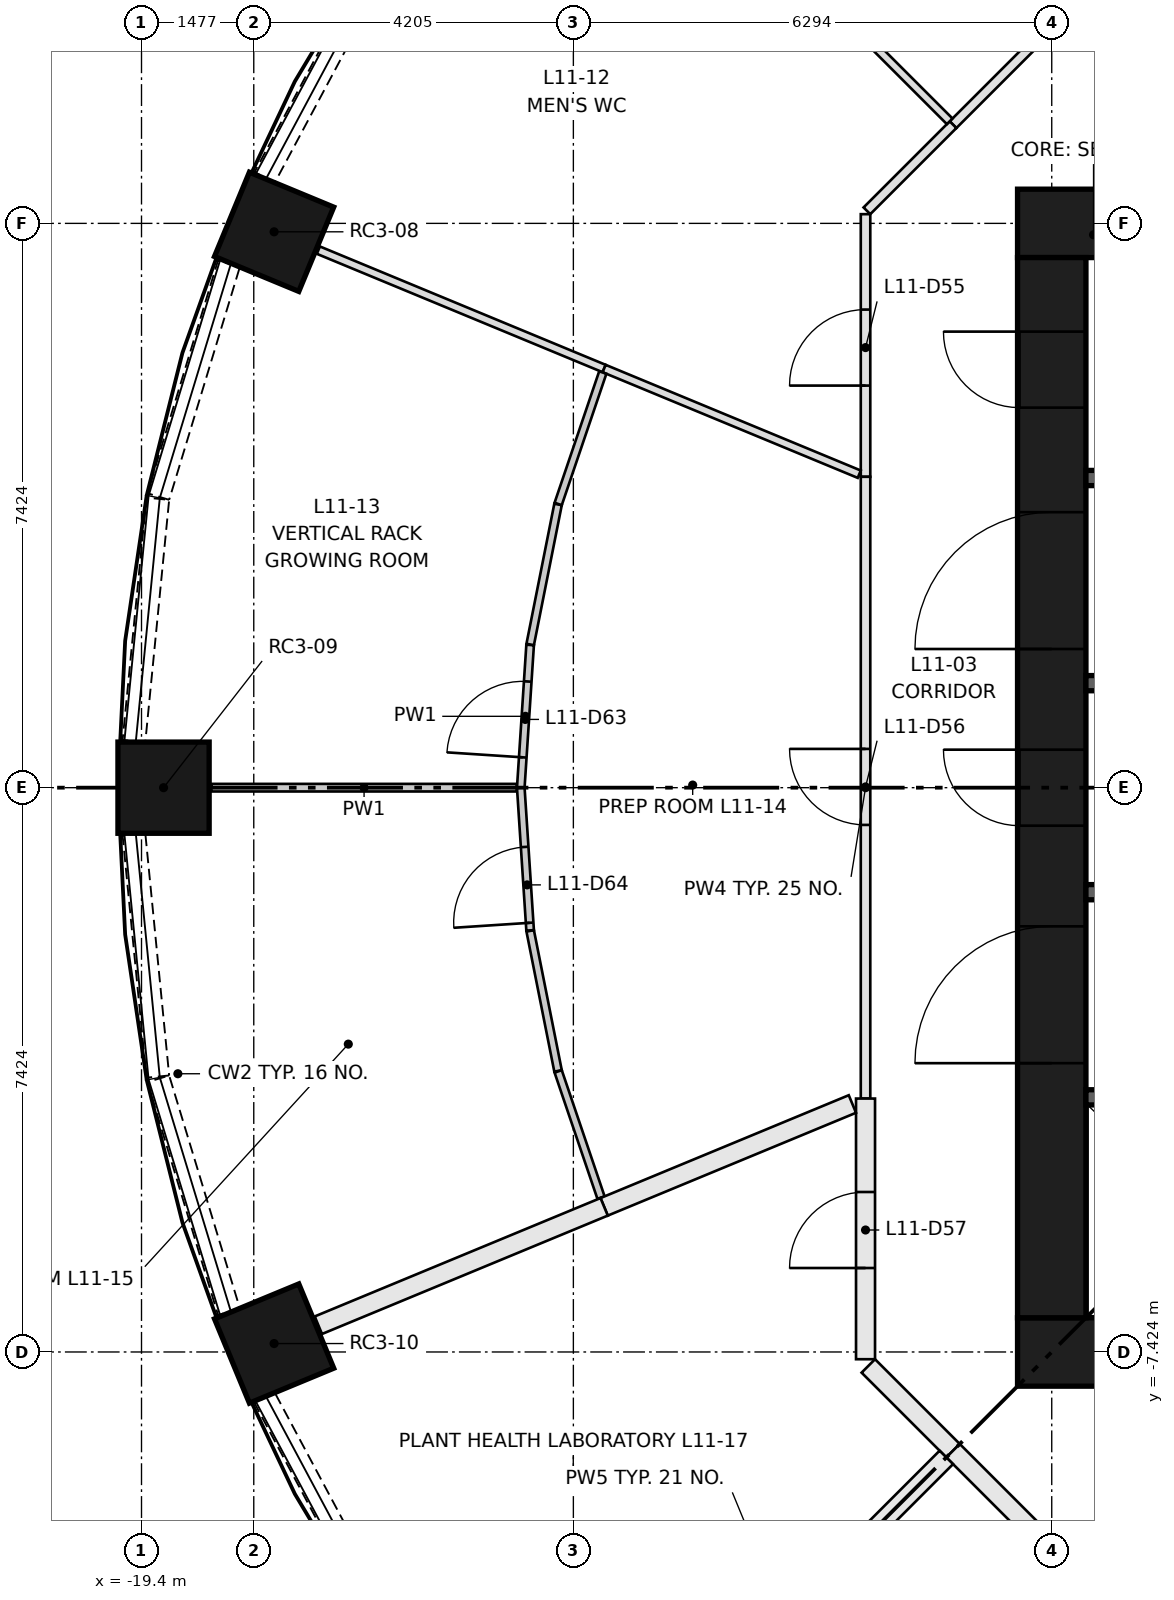
"""IFC4 building model, lengths in metres.
Left out: names, types, materials, properties, quantities, classifications, styles, units other than length and angle.
Written with IfcOpenShell. Run it as: python <this file> out.ifc"""

import sys

from ifc_helpers import new_model, si_unit, direction, frame, frame_2d, origin, origin_2d, place, context, subcontext, project, spatial, rectangle, extrude, element, fill, save


model = new_model("IFC4")
c1 = context("Model", 3, precision=1e-05, world=origin(), true_north=direction((0.0, 1.0)))
c2 = subcontext(c1, "Body", "Model", "MODEL_VIEW")
j1 = project(units=[si_unit("LENGTHUNIT", "METRE"), si_unit("PLANEANGLEUNIT", "RADIAN")], contexts=[c1])
p1 = place(None, origin())
s1 = spatial("IfcSite", under=j1, at=p1, CompositionType="ELEMENT")
p2 = place(p1, origin())
s2 = spatial("IfcBuilding", under=s1, at=p2, CompositionType="ELEMENT")
p3 = place(p2, frame((0.0, 0.0, 44.45)))
s3 = spatial("IfcBuildingStorey", under=s2, at=p3, CompositionType="ELEMENT", Elevation=44.45)
for number, where, z_axis, x_axis in (
    (1, (-17.655, 7.313, 0.0), (0.0, 0.0, 1.0), (-0.924, 0.383, 0.0)),
    (2, (-19.11, 0.0, 0.0), (0.0, 0.0, 1.0), (-1.0, 0.0, 0.0)),
    (3, (-17.655, -7.313, 0.0), (0.0, 0.0, 1.0), (-0.924, -0.383, 0.0)),
):
    element("IfcColumn", number, at=place(p3, frame(where, z_axis=z_axis, x_axis=x_axis)), inside=s3, PredefinedType="COLUMN", context=c2, shape_type="SweptSolid", body=[
        extrude(rectangle(XDim=1.2, YDim=1.2, at=origin_2d()), origin(), (0.0, 0.0, 1.0), 3.65),
    ])
for number, where, z_axis, x_axis in (
    (4, (-7.874, -7.424, 0.0), (0.0, 0.0, 1.0), (1.0, 0.0, 0.0)),
    (5, (-7.874, 7.424, 0.0), (0.0, 0.0, 1.0), (1.0, 0.0, 0.0)),
):
    element("IfcWall", number, at=place(p3, frame(where, z_axis=z_axis, x_axis=x_axis)), inside=s3, PredefinedType="SHEAR", context=c2, shape_type="SweptSolid", body=[
        extrude(rectangle(XDim=15.748, YDim=0.9, at=frame_2d((7.874, 0.0))), origin(), (0.0, 0.0, 1.0), 3.65),
    ])
p4 = place(p3, frame((-7.424, -6.974, 0.0), z_axis=(0.0, 0.0, 1.0), x_axis=(0.0, 1.0, 0.0)))
e6 = element("IfcWall", 6, at=p4, inside=s3, PredefinedType="SHEAR", context=c2, shape_type="SweptSolid", body=[
    extrude(rectangle(XDim=13.948, YDim=0.9, at=frame_2d((6.974, 0.0))), origin(), (0.0, 0.0, 1.0), 3.65),
])
p5 = place(p4, frame((6.474, 0.0, 0.0)))
e7 = element("IfcOpeningElement", 7, at=p5, cuts=e6, PredefinedType="OPENING", context=c2, shape_type="SweptSolid", body=[
    extrude(rectangle(XDim=1.0, YDim=2.1, at=frame_2d((0.5, 1.05))), frame((0.0, 0.46, 0.0), z_axis=(0.0, -1.0, 0.0), x_axis=(1.0, 0.0, 0.0)), (0.0, 0.0, 1.0), 0.92),
])
p6 = place(p4, frame((3.35, 0.0, 0.0)))
e8 = element("IfcOpeningElement", 8, at=p6, cuts=e6, PredefinedType="OPENING", context=c2, shape_type="SweptSolid", body=[
    extrude(rectangle(XDim=1.8, YDim=2.1, at=frame_2d((0.9, 1.05))), frame((0.0, 0.46, 0.0), z_axis=(0.0, -1.0, 0.0), x_axis=(1.0, 0.0, 0.0)), (0.0, 0.0, 1.0), 0.92),
])
p7 = place(p4, frame((8.799, 0.0, 0.0)))
e9 = element("IfcOpeningElement", 9, at=p7, cuts=e6, PredefinedType="OPENING", context=c2, shape_type="SweptSolid", body=[
    extrude(rectangle(XDim=1.8, YDim=2.1, at=frame_2d((0.9, 1.05))), frame((0.0, 0.46, 0.0), z_axis=(0.0, -1.0, 0.0), x_axis=(1.0, 0.0, 0.0)), (0.0, 0.0, 1.0), 0.92),
])
p8 = place(p4, frame((11.974, 0.0, 0.0)))
e10 = element("IfcOpeningElement", 10, at=p8, cuts=e6, PredefinedType="OPENING", context=c2, shape_type="SweptSolid", body=[
    extrude(rectangle(XDim=1.0, YDim=2.1, at=frame_2d((0.5, 1.05))), frame((0.0, 0.46, 0.0), z_axis=(0.0, -1.0, 0.0), x_axis=(1.0, 0.0, 0.0)), (0.0, 0.0, 1.0), 0.92),
])
p9 = place(p3, frame((-6.974, -4.074, 0.0), z_axis=(0.0, 0.0, 1.0), x_axis=(1.0, 0.0, 0.0)))
e11 = element("IfcWall", 11, at=p9, inside=s3, PredefinedType="SHEAR", context=c2, shape_type="SweptSolid", body=[
    extrude(rectangle(XDim=13.948, YDim=0.2, at=frame_2d((6.974, 0.0))), origin(), (0.0, 0.0, 1.0), 3.3),
])
p10 = place(p9, frame((0.918, 0.0, 0.0)))
e12 = element("IfcOpeningElement", 12, at=p10, cuts=e11, PredefinedType="OPENING", context=c2, shape_type="SweptSolid", body=[
    extrude(rectangle(XDim=1.1, YDim=2.1, at=frame_2d((0.55, 1.05))), frame((0.0, 0.11, 0.0), z_axis=(0.0, -1.0, 0.0), x_axis=(1.0, 0.0, 0.0)), (0.0, 0.0, 1.0), 0.22),
])
p11 = place(p9, frame((4.055, 0.0, 0.0)))
e13 = element("IfcOpeningElement", 13, at=p11, cuts=e11, PredefinedType="OPENING", context=c2, shape_type="SweptSolid", body=[
    extrude(rectangle(XDim=1.1, YDim=2.1, at=frame_2d((0.55, 1.05))), frame((0.0, 0.11, 0.0), z_axis=(0.0, -1.0, 0.0), x_axis=(1.0, 0.0, 0.0)), (0.0, 0.0, 1.0), 0.22),
])
p12 = place(p9, frame((6.658, 0.0, 0.0)))
e14 = element("IfcOpeningElement", 14, at=p12, cuts=e11, PredefinedType="OPENING", context=c2, shape_type="SweptSolid", body=[
    extrude(rectangle(XDim=1.0, YDim=2.1, at=frame_2d((0.5, 1.05))), frame((0.0, 0.11, 0.0), z_axis=(0.0, -1.0, 0.0), x_axis=(1.0, 0.0, 0.0)), (0.0, 0.0, 1.0), 0.22),
])
p13 = place(p9, frame((8.627, 0.0, 0.0)))
e15 = element("IfcOpeningElement", 15, at=p13, cuts=e11, PredefinedType="OPENING", context=c2, shape_type="SweptSolid", body=[
    extrude(rectangle(XDim=1.0, YDim=2.1, at=frame_2d((0.5, 1.05))), frame((0.0, 0.11, 0.0), z_axis=(0.0, -1.0, 0.0), x_axis=(1.0, 0.0, 0.0)), (0.0, 0.0, 1.0), 0.22),
])
p14 = place(p9, frame((10.595, 0.0, 0.0)))
e16 = element("IfcOpeningElement", 16, at=p14, cuts=e11, PredefinedType="OPENING", context=c2, shape_type="SweptSolid", body=[
    extrude(rectangle(XDim=1.0, YDim=2.1, at=frame_2d((0.5, 1.05))), frame((0.0, 0.11, 0.0), z_axis=(0.0, -1.0, 0.0), x_axis=(1.0, 0.0, 0.0)), (0.0, 0.0, 1.0), 0.22),
])
p15 = place(p9, frame((12.564, 0.0, 0.0)))
e17 = element("IfcOpeningElement", 17, at=p15, cuts=e11, PredefinedType="OPENING", context=c2, shape_type="SweptSolid", body=[
    extrude(rectangle(XDim=1.0, YDim=2.1, at=frame_2d((0.5, 1.05))), frame((0.0, 0.11, 0.0), z_axis=(0.0, -1.0, 0.0), x_axis=(1.0, 0.0, 0.0)), (0.0, 0.0, 1.0), 0.22),
])
p16 = place(p3, frame((-6.974, 4.074, 0.0), z_axis=(0.0, 0.0, 1.0), x_axis=(1.0, 0.0, 0.0)))
e18 = element("IfcWall", 18, at=p16, inside=s3, PredefinedType="SHEAR", context=c2, shape_type="SweptSolid", body=[
    extrude(rectangle(XDim=6.974, YDim=0.2, at=frame_2d((3.487, 0.0))), origin(), (0.0, 0.0, 1.0), 3.3),
])
for number, where, z_axis, x_axis in (
    (19, (-6.974, -1.375, 0.0), (0.0, 0.0, 1.0), (1.0, 0.0, 0.0)),
    (20, (-6.974, 1.375, 0.0), (0.0, 0.0, 1.0), (1.0, 0.0, 0.0)),
):
    element("IfcWall", number, at=place(p3, frame(where, z_axis=z_axis, x_axis=x_axis)), inside=s3, PredefinedType="SHEAR", context=c2, shape_type="SweptSolid", body=[
        extrude(rectangle(XDim=2.6, YDim=0.2, at=frame_2d((1.3, 0.0))), origin(), (0.0, 0.0, 1.0), 3.3),
    ])
p17 = place(p3, frame((-16.27, 10.854, 0.0), z_axis=(0.0, 0.0, 1.0), x_axis=(-0.471284265614, -0.881981372243, 0.0)))
e21 = element("IfcWall", 21, at=p17, inside=s3, PredefinedType="SOLIDWALL", context=c2, shape_type="SweptSolid", body=[
    extrude(rectangle(XDim=3.204, YDim=0.3, at=frame_2d((1.602, 0.0))), origin(), (0.0, 0.0, 1.0), 0.9),
])
p18 = place(p3, frame((-18.25, 6.895, 0.0), z_axis=(0.0, 0.0, 1.0), x_axis=(-0.290472877795, -0.956883225512, 0.0)))
e22 = element("IfcWall", 22, at=p18, inside=s3, PredefinedType="SOLIDWALL", context=c2, shape_type="SweptSolid", body=[
    extrude(rectangle(XDim=3.202, YDim=0.3, at=frame_2d((1.601, 0.0))), origin(), (0.0, 0.0, 1.0), 0.9),
])
for number, where, z_axis, x_axis in (
    (23, (-19.186, 3.801, 0.0), (0.0, 0.0, 1.0), (-0.098, -0.995, 0.0)),
    (24, (-19.5, -0.613, 0.0), (0.0, 0.0, 1.0), (0.098, -0.995, 0.0)),
):
    element("IfcWall", number, at=place(p3, frame(where, z_axis=z_axis, x_axis=x_axis)), inside=s3, PredefinedType="SOLIDWALL", context=c2, shape_type="SweptSolid", body=[
        extrude(rectangle(XDim=3.204, YDim=0.3, at=frame_2d((1.602, 0.0))), origin(), (0.0, 0.0, 1.0), 0.9),
    ])
p19 = place(p3, frame((-19.18, -3.83, 0.0), z_axis=(0.0, 0.0, 1.0), x_axis=(0.290472877795, -0.956883225512, 0.0)))
e25 = element("IfcWall", 25, at=p19, inside=s3, PredefinedType="SOLIDWALL", context=c2, shape_type="SweptSolid", body=[
    extrude(rectangle(XDim=3.202, YDim=0.3, at=frame_2d((1.601, 0.0))), origin(), (0.0, 0.0, 1.0), 0.9),
])
p20 = place(p3, frame((-17.78, -8.028, 0.0), z_axis=(0.0, 0.0, 1.0), x_axis=(0.471284265614, -0.881981372243, 0.0)))
e26 = element("IfcWall", 26, at=p20, inside=s3, PredefinedType="SOLIDWALL", context=c2, shape_type="SweptSolid", body=[
    extrude(rectangle(XDim=3.204, YDim=0.3, at=frame_2d((1.602, 0.0))), origin(), (0.0, 0.0, 1.0), 0.9),
])
p21 = place(p3, frame((-8.722, 8.722, 0.0), z_axis=(0.0, 0.0, 1.0), x_axis=(0.707030604857, 0.70718294931, 0.0)))
e27 = element("IfcWall", 27, at=p21, inside=s3, PredefinedType="PARTITIONING", context=c2, shape_type="SweptSolid", body=[
    extrude(rectangle(XDim=1.603, YDim=0.125, at=frame_2d((0.801, 0.0))), origin(), (0.0, 0.0, 1.0), 3.3),
])
p22 = place(p3, frame((-9.874, 4.09, 0.0), z_axis=(0.0, 0.0, 1.0), x_axis=(0.0, 1.0, 0.0)))
e28 = element("IfcWall", 28, at=p22, inside=s3, PredefinedType="PARTITIONING", context=c2, shape_type="SweptSolid", body=[
    extrude(rectangle(XDim=3.455, YDim=0.125, at=frame_2d((1.728, 0.0))), origin(), (0.0, 0.0, 1.0), 3.3),
])
p23 = place(p22, frame((1.2, 0.0, 0.0)))
e29 = element("IfcOpeningElement", 29, at=p23, cuts=e28, PredefinedType="OPENING", context=c2, shape_type="SweptSolid", body=[
    extrude(rectangle(XDim=1.0, YDim=2.1, at=frame_2d((0.5, 1.05))), frame((0.0, 0.073, 0.0), z_axis=(0.0, -1.0, 0.0), x_axis=(1.0, 0.0, 0.0)), (0.0, 0.0, 1.0), 0.145),
])
p24 = place(p3, frame((-9.856, 7.589, 0.0), z_axis=(0.0, 0.0, 1.0), x_axis=(0.70718294931, 0.707030604857, 0.0)))
e30 = element("IfcWall", 30, at=p24, inside=s3, PredefinedType="PARTITIONING", context=c2, shape_type="SweptSolid", body=[
    extrude(rectangle(XDim=1.603, YDim=0.125, at=frame_2d((0.801, 0.0))), origin(), (0.0, 0.0, 1.0), 3.3),
])
p25 = place(p3, frame((-9.874, -4.09, 0.0), z_axis=(0.0, 0.0, 1.0), x_axis=(0.0, 1.0, 0.0)))
e31 = element("IfcWall", 31, at=p25, inside=s3, PredefinedType="PARTITIONING", context=c2, shape_type="SweptSolid", body=[
    extrude(rectangle(XDim=8.18, YDim=0.125, at=frame_2d((4.09, 0.0))), origin(), (0.0, 0.0, 1.0), 3.3),
])
p26 = place(p25, frame((3.6, 0.0, 0.0)))
e32 = element("IfcOpeningElement", 32, at=p26, cuts=e31, PredefinedType="OPENING", context=c2, shape_type="SweptSolid", body=[
    extrude(rectangle(XDim=1.0, YDim=2.1, at=frame_2d((0.5, 1.05))), frame((0.0, 0.073, 0.0), z_axis=(0.0, -1.0, 0.0), x_axis=(1.0, 0.0, 0.0)), (0.0, 0.0, 1.0), 0.145),
])
p27 = place(p3, frame((-9.874, -7.519, 0.0), z_axis=(0.0, 0.0, 1.0), x_axis=(0.0, 1.0, 0.0)))
e33 = element("IfcWall", 33, at=p27, inside=s3, PredefinedType="PARTITIONING", context=c2, shape_type="SweptSolid", body=[
    extrude(rectangle(XDim=3.429, YDim=0.25, at=frame_2d((1.715, 0.0))), origin(), (0.0, 0.0, 1.0), 3.3),
])
p28 = place(p27, frame((1.2, 0.0, 0.0)))
e34 = element("IfcOpeningElement", 34, at=p28, cuts=e33, PredefinedType="OPENING", context=c2, shape_type="SweptSolid", body=[
    extrude(rectangle(XDim=1.0, YDim=2.1, at=frame_2d((0.5, 1.05))), frame((0.0, 0.135, 0.0), z_axis=(0.0, -1.0, 0.0), x_axis=(1.0, 0.0, 0.0)), (0.0, 0.0, 1.0), 0.27),
])
for number, where, z_axis, x_axis in (
    (35, (-8.722, -8.722, 0.0), (0.0, 0.0, 1.0), (-0.707, 0.707, 0.0)),
    (36, (-7.608, -9.837, 0.0), (0.0, 0.0, 1.0), (-0.707, 0.707, 0.0)),
):
    element("IfcWall", number, at=place(p3, frame(where, z_axis=z_axis, x_axis=x_axis)), inside=s3, PredefinedType="PARTITIONING", context=c2, shape_type="SweptSolid", body=[
        extrude(rectangle(XDim=1.577, YDim=0.25, at=frame_2d((0.788, 0.0))), origin(), (0.0, 0.0, 1.0), 3.3),
    ])
p29 = place(p3, frame((-8.767, 8.767, 0.0), z_axis=(0.0, 0.0, 1.0), x_axis=(-0.707106781187, 0.707106781187, 0.0)))
e37 = element("IfcWall", 37, at=p29, inside=s3, PredefinedType="PARTITIONING", context=c2, shape_type="SweptSolid", body=[
    extrude(rectangle(XDim=6.082, YDim=0.105, at=frame_2d((3.041, 0.0))), origin(), (0.0, 0.0, 1.0), 3.3),
])
p30 = place(p3, frame((-13.313, 5.514, 0.0), z_axis=(0.0, 0.0, 1.0), x_axis=(-0.923873536763, 0.382697907061, 0.0)))
e38 = element("IfcWall", 38, at=p30, inside=s3, PredefinedType="PARTITIONING", context=c2, shape_type="SweptSolid", body=[
    extrude(rectangle(XDim=4.07, YDim=0.105, at=frame_2d((2.035, 0.0))), origin(), (0.0, 0.0, 1.0), 3.3),
])
p31 = place(p3, frame((-9.957, 4.124, 0.0), z_axis=(0.0, 0.0, 1.0), x_axis=(-0.923870220065, 0.382705913825, 0.0)))
e39 = element("IfcWall", 39, at=p31, inside=s3, PredefinedType="PARTITIONING", context=c2, shape_type="SweptSolid", body=[
    extrude(rectangle(XDim=3.633, YDim=0.105, at=frame_2d((1.816, 0.0))), origin(), (0.0, 0.0, 1.0), 3.3),
])
p32 = place(p3, frame((-14.41, 0.0, 0.0), z_axis=(0.0, 0.0, 1.0), x_axis=(0.065390885675, 0.997859725648, 0.0)))
e40 = element("IfcWall", 40, at=p32, inside=s3, PredefinedType="PARTITIONING", context=c2, shape_type="SweptSolid", body=[
    extrude(rectangle(XDim=1.882, YDim=0.1, at=frame_2d((0.941, 0.0))), origin(), (0.0, 0.0, 1.0), 3.3),
])
p33 = place(p32, frame((0.4, 0.0, 0.0)))
e41 = element("IfcOpeningElement", 41, at=p33, cuts=e40, PredefinedType="OPENING", context=c2, shape_type="SweptSolid", body=[
    extrude(rectangle(XDim=1.0, YDim=2.1, at=frame_2d((0.5, 1.05))), frame((0.0, 0.06, 0.0), z_axis=(0.0, -1.0, 0.0), x_axis=(1.0, 0.0, 0.0)), (0.0, 0.0, 1.0), 0.12),
])
p34 = place(p3, frame((-13.92, 3.726, 0.0), z_axis=(0.0, 0.0, 1.0), x_axis=(-0.195091231684, -0.980785099459, 0.0)))
e42 = element("IfcWall", 42, at=p34, inside=s3, PredefinedType="PARTITIONING", context=c2, shape_type="SweptSolid", body=[
    extrude(rectangle(XDim=1.878, YDim=0.1, at=frame_2d((0.939, 0.0))), origin(), (0.0, 0.0, 1.0), 3.3),
])
p35 = place(p3, frame((-13.331, 5.461, 0.0), z_axis=(0.0, 0.0, 1.0), x_axis=(-0.321478362794, -0.946916924685, 0.0)))
e43 = element("IfcWall", 43, at=p35, inside=s3, PredefinedType="PARTITIONING", context=c2, shape_type="SweptSolid", body=[
    extrude(rectangle(XDim=1.826, YDim=0.1, at=frame_2d((0.913, 0.0))), origin(), (0.0, 0.0, 1.0), 3.3),
])
p36 = place(p3, frame((-14.463, 0.0, 0.0), z_axis=(0.0, 0.0, 1.0), x_axis=(-1.0, 0.0, 0.0)))
e44 = element("IfcWall", 44, at=p36, inside=s3, PredefinedType="PARTITIONING", context=c2, shape_type="SweptSolid", body=[
    extrude(rectangle(XDim=4.017, YDim=0.1, at=frame_2d((2.008, 0.0))), origin(), (0.0, 0.0, 1.0), 3.3),
])
p37 = place(p3, frame((-14.287, -1.878, 0.0), z_axis=(0.0, 0.0, 1.0), x_axis=(-0.065390885675, 0.997859725648, 0.0)))
e45 = element("IfcWall", 45, at=p37, inside=s3, PredefinedType="PARTITIONING", context=c2, shape_type="SweptSolid", body=[
    extrude(rectangle(XDim=1.882, YDim=0.1, at=frame_2d((0.941, 0.0))), origin(), (0.0, 0.0, 1.0), 3.3),
])
p38 = place(p37, frame((0.1, 0.0, 0.0)))
e46 = element("IfcOpeningElement", 46, at=p38, cuts=e45, PredefinedType="OPENING", context=c2, shape_type="SweptSolid", body=[
    extrude(rectangle(XDim=1.0, YDim=2.1, at=frame_2d((0.5, 1.05))), frame((0.0, 0.06, 0.0), z_axis=(0.0, -1.0, 0.0), x_axis=(1.0, 0.0, 0.0)), (0.0, 0.0, 1.0), 0.12),
])
p39 = place(p3, frame((-13.92, -3.726, 0.0), z_axis=(0.0, 0.0, 1.0), x_axis=(-0.195091231684, 0.980785099459, 0.0)))
e47 = element("IfcWall", 47, at=p39, inside=s3, PredefinedType="PARTITIONING", context=c2, shape_type="SweptSolid", body=[
    extrude(rectangle(XDim=1.878, YDim=0.1, at=frame_2d((0.939, 0.0))), origin(), (0.0, 0.0, 1.0), 3.3),
])
p40 = place(p3, frame((-13.354, -5.393, 0.0), z_axis=(0.0, 0.0, 1.0), x_axis=(-0.321445771201, 0.946927988908, 0.0)))
e48 = element("IfcWall", 48, at=p40, inside=s3, PredefinedType="PARTITIONING", context=c2, shape_type="SweptSolid", body=[
    extrude(rectangle(XDim=1.753, YDim=0.1, at=frame_2d((0.876, 0.0))), origin(), (0.0, 0.0, 1.0), 3.3),
])
p41 = place(p3, frame((-10.047, -4.162, 0.0), z_axis=(0.0, 0.0, 1.0), x_axis=(-0.92388805455, -0.382662857696, 0.0)))
e49 = element("IfcWall", 49, at=p41, inside=s3, PredefinedType="PARTITIONING", context=c2, shape_type="SweptSolid", body=[
    extrude(rectangle(XDim=3.535, YDim=0.25, at=frame_2d((1.768, 0.0))), origin(), (0.0, 0.0, 1.0), 3.3),
])
p42 = place(p3, frame((-13.313, -5.514, 0.0), z_axis=(0.0, 0.0, 1.0), x_axis=(-0.923873536763, -0.382697907061, 0.0)))
e50 = element("IfcWall", 50, at=p42, inside=s3, PredefinedType="PARTITIONING", context=c2, shape_type="SweptSolid", body=[
    extrude(rectangle(XDim=4.07, YDim=0.25, at=frame_2d((2.035, 0.0))), origin(), (0.0, 0.0, 1.0), 3.3),
])
p43 = place(p3, frame((-13.067, -13.067, 0.0), z_axis=(0.0, 0.0, 1.0), x_axis=(0.707106781187, 0.707106781187, 0.0)))
e51 = element("IfcWall", 51, at=p43, inside=s3, PredefinedType="PARTITIONING", context=c2, shape_type="SweptSolid", body=[
    extrude(rectangle(XDim=6.02, YDim=0.25, at=frame_2d((3.01, 0.0))), origin(), (0.0, 0.0, 1.0), 3.3),
])
p44 = place(p5, origin())
e52 = element("IfcDoor", 52, at=p44, inside=s3, OperationType="SINGLE_SWING_RIGHT", PredefinedType="DOOR", context=c2, shape_type="SweptSolid", body=[
    extrude(rectangle(XDim=1.0, YDim=2.1, at=frame_2d((0.5, 1.05))), frame((0.0, 0.45, 0.0), z_axis=(0.0, -1.0, 0.0), x_axis=(1.0, 0.0, 0.0)), (0.0, 0.0, 1.0), 0.05),
])
fill(e7, e52)
p45 = place(p6, origin())
e53 = element("IfcDoor", 53, at=p45, inside=s3, OperationType="DOUBLE_DOOR_SINGLE_SWING", PredefinedType="DOOR", context=c2, shape_type="SweptSolid", body=[
    extrude(rectangle(XDim=1.8, YDim=2.1, at=frame_2d((0.9, 1.05))), frame((0.0, 0.025, 0.0), z_axis=(0.0, -1.0, 0.0), x_axis=(1.0, 0.0, 0.0)), (0.0, 0.0, 1.0), 0.05),
])
fill(e8, e53)
p46 = place(p7, origin())
e54 = element("IfcDoor", 54, at=p46, inside=s3, OperationType="DOUBLE_DOOR_SINGLE_SWING", PredefinedType="DOOR", context=c2, shape_type="SweptSolid", body=[
    extrude(rectangle(XDim=1.8, YDim=2.1, at=frame_2d((0.9, 1.05))), frame((0.0, 0.025, 0.0), z_axis=(0.0, -1.0, 0.0), x_axis=(1.0, 0.0, 0.0)), (0.0, 0.0, 1.0), 0.05),
])
fill(e9, e54)
p47 = place(p8, origin())
e55 = element("IfcDoor", 55, at=p47, inside=s3, OperationType="SINGLE_SWING_RIGHT", PredefinedType="DOOR", context=c2, shape_type="SweptSolid", body=[
    extrude(rectangle(XDim=1.0, YDim=2.1, at=frame_2d((0.5, 1.05))), frame((0.0, 0.45, 0.0), z_axis=(0.0, -1.0, 0.0), x_axis=(1.0, 0.0, 0.0)), (0.0, 0.0, 1.0), 0.05),
])
fill(e10, e55)
p48 = place(p23, origin())
e56 = element("IfcDoor", 56, at=p48, inside=s3, OperationType="SINGLE_SWING_LEFT", PredefinedType="DOOR", context=c2, shape_type="SweptSolid", body=[
    extrude(rectangle(XDim=1.0, YDim=2.1, at=frame_2d((0.5, 1.05))), frame((0.0, 0.025, 0.0), z_axis=(0.0, -1.0, 0.0), x_axis=(1.0, 0.0, 0.0)), (0.0, 0.0, 1.0), 0.05),
])
fill(e29, e56)
p49 = place(p26, origin())
e57 = element("IfcDoor", 57, at=p49, inside=s3, OperationType="SINGLE_SWING_RIGHT", PredefinedType="DOOR", context=c2, shape_type="SweptSolid", body=[
    extrude(rectangle(XDim=1.0, YDim=2.1, at=frame_2d((0.5, 1.05))), frame((0.0, 0.025, 0.0), z_axis=(0.0, -1.0, 0.0), x_axis=(1.0, 0.0, 0.0)), (0.0, 0.0, 1.0), 0.05),
])
fill(e32, e57)
p50 = place(p28, origin())
e58 = element("IfcDoor", 58, at=p50, inside=s3, OperationType="SINGLE_SWING_LEFT", PredefinedType="DOOR", context=c2, shape_type="SweptSolid", body=[
    extrude(rectangle(XDim=1.0, YDim=2.1, at=frame_2d((0.5, 1.05))), frame((0.0, 0.025, 0.0), z_axis=(0.0, -1.0, 0.0), x_axis=(1.0, 0.0, 0.0)), (0.0, 0.0, 1.0), 0.05),
])
fill(e34, e58)
p51 = place(p33, origin())
e59 = element("IfcDoor", 59, at=p51, inside=s3, OperationType="SINGLE_SWING_LEFT", PredefinedType="DOOR", context=c2, shape_type="SweptSolid", body=[
    extrude(rectangle(XDim=1.0, YDim=2.1, at=frame_2d((0.5, 1.05))), frame((0.0, 0.025, 0.0), z_axis=(0.0, -1.0, 0.0), x_axis=(1.0, 0.0, 0.0)), (0.0, 0.0, 1.0), 0.05),
])
fill(e41, e59)
p52 = place(p38, origin())
e60 = element("IfcDoor", 60, at=p52, inside=s3, OperationType="SINGLE_SWING_LEFT", PredefinedType="DOOR", context=c2, shape_type="SweptSolid", body=[
    extrude(rectangle(XDim=1.0, YDim=2.1, at=frame_2d((0.5, 1.05))), frame((0.0, 0.025, 0.0), z_axis=(0.0, -1.0, 0.0), x_axis=(1.0, 0.0, 0.0)), (0.0, 0.0, 1.0), 0.05),
])
fill(e46, e60)
save(model, sys.argv[1])
